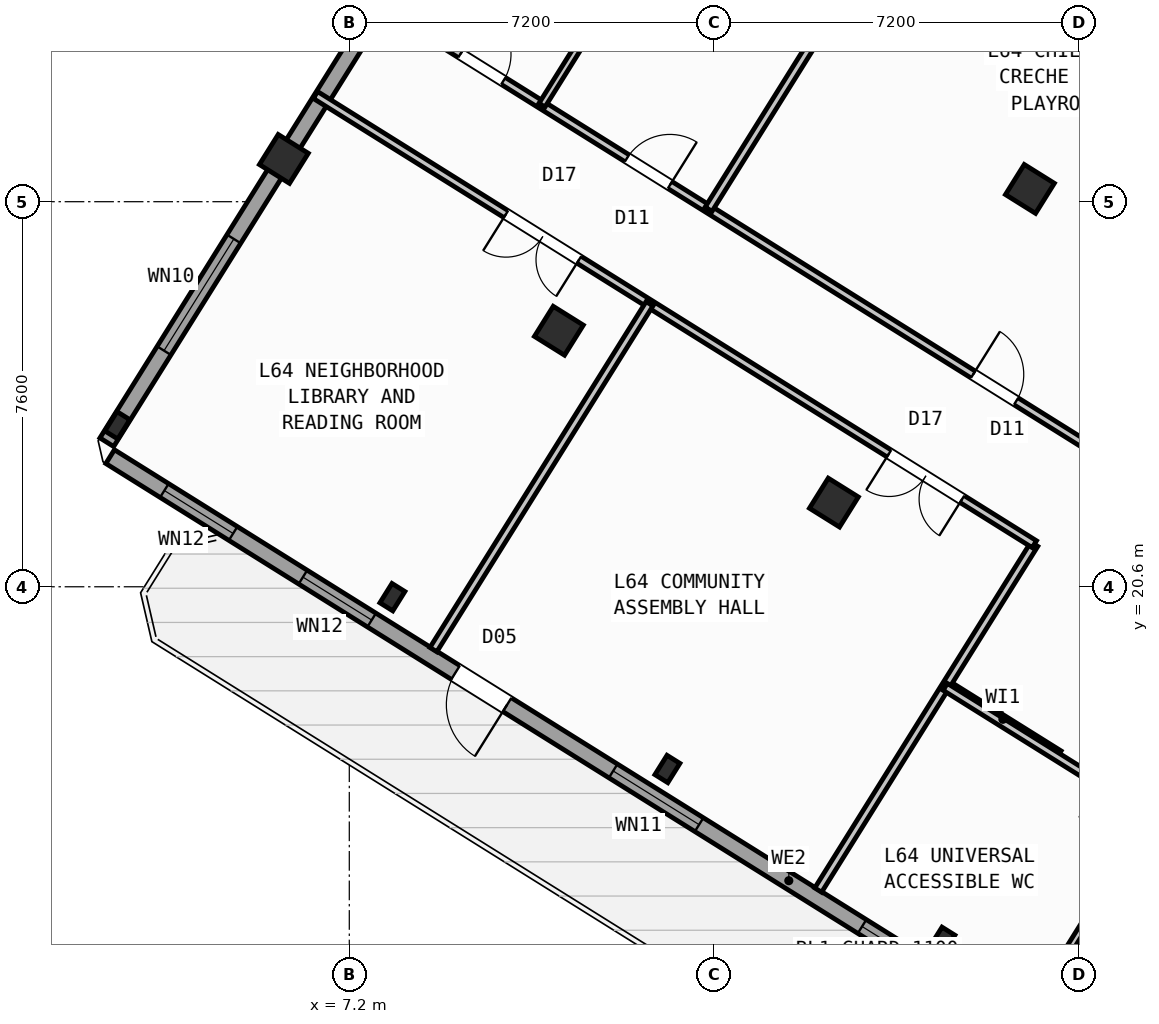
"""IFC4 building model, lengths in metres.
Left out: names, types, materials, properties, quantities, classifications, styles, units other than length and angle.
Written with IfcOpenShell. Run it as: python <this file> out.ifc"""

import sys

from ifc_helpers import new_model, si_unit, direction, frame, frame_2d, origin, origin_2d, place, context, subcontext, project, spatial, rectangle, hollow_rectangle, i_section, extrude, source, transform, mapped, element, fill, save


model = new_model("IFC4")
c1 = context("Model", 3, precision=1e-05, world=origin(), true_north=direction((0.0, 1.0)))
c2 = subcontext(c1, "Body", "Model", "MODEL_VIEW")
j1 = project(units=[si_unit("LENGTHUNIT", "METRE"), si_unit("PLANEANGLEUNIT", "RADIAN")], contexts=[c1])
p1 = place(None, origin())
s1 = spatial("IfcSite", under=j1, at=p1, CompositionType="ELEMENT")
p2 = place(p1, origin())
s2 = spatial("IfcBuilding", under=s1, at=p2, CompositionType="ELEMENT")
p3 = place(p2, frame((0.0, 0.0, 254.7)))
s3 = spatial("IfcBuildingStorey", under=s2, at=p3, CompositionType="ELEMENT", Elevation=254.7)
m1 = source(origin(), c2, "Body", "SweptSolid", [
    extrude(i_section(OverallWidth=0.3, OverallDepth=0.45, WebThickness=0.014, FlangeThickness=0.026, at=origin_2d()), origin(), (0.0, 0.0, 1.0), 4.5),
])
p4 = place(p3, frame((18.906, 13.612, 0.0), z_axis=(0.0, 0.0, 1.0), x_axis=(-0.848048096156, 0.529919264233, 0.0)))
e1 = element("IfcColumn", 1, at=p4, inside=s3, PredefinedType="COLUMN", context=c2, shape_type="MappedRepresentation", body=[
    mapped(m1, transform((0.0, 0.0, 0.0), scale=1.0)),
])
m2 = source(origin(), c2, "Body", "SweptSolid", [
    extrude(hollow_rectangle(XDim=0.7, YDim=0.7, WallThickness=0.028, at=origin_2d()), origin(), (0.0, 0.0, 1.0), 4.5),
])
for number, where, z_axis, x_axis in (
    (2, (20.632, 28.452, 0.0), (0.0, 0.0, 1.0), (-0.848, 0.53, 0.0)),
    (3, (16.764, 22.261, 0.0), (0.0, 0.0, 1.0), (-0.848, 0.53, 0.0)),
):
    element("IfcColumn", number, at=place(p3, frame(where, z_axis=z_axis, x_axis=x_axis)), inside=s3, PredefinedType="COLUMN", context=c2, shape_type="MappedRepresentation", body=[
        mapped(m2, transform((0.0, 0.0, 0.0), scale=1.0)),
    ])
p5 = place(p3, frame((13.478, 17.003, 0.0), z_axis=(0.0, 0.0, 1.0), x_axis=(-0.848048096156, 0.529919264233, 0.0)))
e4 = element("IfcColumn", 4, at=p5, inside=s3, PredefinedType="COLUMN", context=c2, shape_type="MappedRepresentation", body=[
    mapped(m1, transform((0.0, 0.0, 0.0), scale=1.0)),
])
p6 = place(p3, frame((11.336, 25.653, 0.0), z_axis=(0.0, 0.0, 1.0), x_axis=(-0.848048096156, 0.529919264233, 0.0)))
e5 = element("IfcColumn", 5, at=p6, inside=s3, PredefinedType="COLUMN", context=c2, shape_type="MappedRepresentation", body=[
    mapped(m2, transform((0.0, 0.0, 0.0), scale=1.0)),
])
p7 = place(p3, frame((8.051, 20.395, 0.0), z_axis=(0.0, 0.0, 1.0), x_axis=(-0.848048096156, 0.529919264233, 0.0)))
e6 = element("IfcColumn", 6, at=p7, inside=s3, PredefinedType="COLUMN", context=c2, shape_type="MappedRepresentation", body=[
    mapped(m1, transform((0.0, 0.0, 0.0), scale=1.0)),
])
p8 = place(p3, frame((5.909, 29.044, 0.0), z_axis=(0.0, 0.0, 1.0), x_axis=(-0.848048096156, 0.529919264233, 0.0)))
e7 = element("IfcColumn", 7, at=p8, inside=s3, PredefinedType="COLUMN", context=c2, shape_type="MappedRepresentation", body=[
    mapped(m2, transform((0.0, 0.0, 0.0), scale=1.0)),
])
p9 = place(p3, frame((2.623, 23.786, 0.0), z_axis=(0.0, 0.0, 1.0), x_axis=(-0.848048096156, 0.529919264233, 0.0)))
e8 = element("IfcColumn", 8, at=p9, inside=s3, PredefinedType="COLUMN", context=c2, shape_type="MappedRepresentation", body=[
    mapped(m1, transform((0.0, 0.0, 0.0), scale=1.0)),
])
p10 = place(p3, frame((29.268, 6.429, 0.0), z_axis=(0.0, 0.0, 1.0), x_axis=(-0.848049971435, 0.529916263149, 0.0)))
e9 = element("IfcWall", 9, at=p10, inside=s3, PredefinedType="STANDARD", context=c2, shape_type="SweptSolid", body=[
    extrude(rectangle(XDim=31.588, YDim=0.32, at=frame_2d((15.794, 0.0))), origin(), (0.0, 0.0, 1.0), 4.25),
])
p11 = place(p10, frame((22.349, 0.0, 0.0)))
e10 = element("IfcOpeningElement", 10, at=p11, cuts=e9, PredefinedType="OPENING", context=c2, shape_type="SweptSolid", body=[
    extrude(rectangle(XDim=1.2, YDim=2.15, at=frame_2d((0.6, 1.075))), frame((0.0, 0.17, 0.0), z_axis=(0.0, -1.0, 0.0), x_axis=(1.0, 0.0, 0.0)), (0.0, 0.0, 1.0), 0.34),
])
p12 = place(p10, frame((11.489, 0.0, 0.7)))
e11 = element("IfcOpeningElement", 11, at=p12, cuts=e9, PredefinedType="OPENING", context=c2, shape_type="SweptSolid", body=[
    extrude(rectangle(XDim=2.6, YDim=2.0, at=frame_2d((1.3, 1.0))), frame((0.0, 0.17, 0.0), z_axis=(0.0, -1.0, 0.0), x_axis=(1.0, 0.0, 0.0)), (0.0, 0.0, 1.0), 0.34),
])
p13 = place(p10, frame((17.881, 0.0, 0.75)))
e12 = element("IfcOpeningElement", 12, at=p13, cuts=e9, PredefinedType="OPENING", context=c2, shape_type="SweptSolid", body=[
    extrude(rectangle(XDim=2.0, YDim=1.95, at=frame_2d((1.0, 0.975))), frame((0.0, 0.17, 0.0), z_axis=(0.0, -1.0, 0.0), x_axis=(1.0, 0.0, 0.0)), (0.0, 0.0, 1.0), 0.34),
])
p14 = place(p10, frame((25.501, 0.0, 0.85)))
e13 = element("IfcOpeningElement", 13, at=p14, cuts=e9, PredefinedType="OPENING", context=c2, shape_type="SweptSolid", body=[
    extrude(rectangle(XDim=1.6, YDim=1.8, at=frame_2d((0.8, 0.9))), frame((0.0, 0.17, 0.0), z_axis=(0.0, -1.0, 0.0), x_axis=(1.0, 0.0, 0.0)), (0.0, 0.0, 1.0), 0.34),
])
p15 = place(p10, frame((28.725, 0.0, 0.85)))
e14 = element("IfcOpeningElement", 14, at=p15, cuts=e9, PredefinedType="OPENING", context=c2, shape_type="SweptSolid", body=[
    extrude(rectangle(XDim=1.6, YDim=1.8, at=frame_2d((0.8, 0.9))), frame((0.0, 0.17, 0.0), z_axis=(0.0, -1.0, 0.0), x_axis=(1.0, 0.0, 0.0)), (0.0, 0.0, 1.0), 0.34),
])
p16 = place(p3, frame((2.415, 23.452, 0.0), z_axis=(0.0, 0.0, 1.0), x_axis=(0.52991049553, 0.848053575387, 0.0)))
e15 = element("IfcWall", 15, at=p16, inside=s3, PredefinedType="STANDARD", context=c2, shape_type="SweptSolid", body=[
    extrude(rectangle(XDim=21.587, YDim=0.32, at=frame_2d((10.794, 0.0))), origin(), (0.0, 0.0, 1.0), 3.775),
])
p17 = place(p16, frame((2.131, 0.0, 0.7)))
e16 = element("IfcOpeningElement", 16, at=p17, cuts=e15, PredefinedType="OPENING", context=c2, shape_type="SweptSolid", body=[
    extrude(rectangle(XDim=2.6, YDim=2.0, at=frame_2d((1.3, 1.0))), frame((0.0, 0.17, 0.0), z_axis=(0.0, -1.0, 0.0), x_axis=(1.0, 0.0, 0.0)), (0.0, 0.0, 1.0), 0.34),
])
p18 = place(p16, frame((10.959, 0.0, 0.75)))
e17 = element("IfcOpeningElement", 17, at=p18, cuts=e15, PredefinedType="OPENING", context=c2, shape_type="SweptSolid", body=[
    extrude(rectangle(XDim=2.0, YDim=1.95, at=frame_2d((1.0, 0.975))), frame((0.0, 0.17, 0.0), z_axis=(0.0, -1.0, 0.0), x_axis=(1.0, 0.0, 0.0)), (0.0, 0.0, 1.0), 0.34),
])
p19 = place(p16, frame((15.269, 0.0, 0.85)))
e18 = element("IfcOpeningElement", 18, at=p19, cuts=e15, PredefinedType="OPENING", context=c2, shape_type="SweptSolid", body=[
    extrude(rectangle(XDim=1.6, YDim=1.8, at=frame_2d((0.8, 0.9))), frame((0.0, 0.17, 0.0), z_axis=(0.0, -1.0, 0.0), x_axis=(1.0, 0.0, 0.0)), (0.0, 0.0, 1.0), 0.34),
])
p20 = place(p16, frame((18.219, 0.0, 0.85)))
e19 = element("IfcOpeningElement", 19, at=p20, cuts=e15, PredefinedType="OPENING", context=c2, shape_type="SweptSolid", body=[
    extrude(rectangle(XDim=1.6, YDim=1.8, at=frame_2d((0.8, 0.9))), frame((0.0, 0.17, 0.0), z_axis=(0.0, -1.0, 0.0), x_axis=(1.0, 0.0, 0.0)), (0.0, 0.0, 1.0), 0.34),
])
p21 = place(p3, frame((14.138, 41.825, 0.0), z_axis=(0.0, 0.0, 1.0), x_axis=(0.848046498049, -0.529921821731, 0.0)))
e20 = element("IfcWall", 20, at=p21, inside=s3, PredefinedType="STANDARD", context=c2, shape_type="SweptSolid", body=[
    extrude(rectangle(XDim=31.588, YDim=0.32, at=frame_2d((15.794, 0.0))), origin(), (0.0, 0.0, 1.0), 4.25),
])
p22 = place(p21, frame((9.946, 0.0, 0.0)))
e21 = element("IfcOpeningElement", 21, at=p22, cuts=e20, PredefinedType="OPENING", context=c2, shape_type="SweptSolid", body=[
    extrude(rectangle(XDim=1.05, YDim=2.15, at=frame_2d((0.525, 1.075))), frame((0.0, 0.17, 0.0), z_axis=(0.0, -1.0, 0.0), x_axis=(1.0, 0.0, 0.0)), (0.0, 0.0, 1.0), 0.34),
])
p23 = place(p21, frame((0.763, 0.0, 0.75)))
e22 = element("IfcOpeningElement", 22, at=p23, cuts=e20, PredefinedType="OPENING", context=c2, shape_type="SweptSolid", body=[
    extrude(rectangle(XDim=2.0, YDim=1.95, at=frame_2d((1.0, 0.975))), frame((0.0, 0.17, 0.0), z_axis=(0.0, -1.0, 0.0), x_axis=(1.0, 0.0, 0.0)), (0.0, 0.0, 1.0), 0.34),
])
p24 = place(p21, frame((13.574, 0.0, 0.75)))
e23 = element("IfcOpeningElement", 23, at=p24, cuts=e20, PredefinedType="OPENING", context=c2, shape_type="SweptSolid", body=[
    extrude(rectangle(XDim=2.0, YDim=1.95, at=frame_2d((1.0, 0.975))), frame((0.0, 0.17, 0.0), z_axis=(0.0, -1.0, 0.0), x_axis=(1.0, 0.0, 0.0)), (0.0, 0.0, 1.0), 0.34),
])
p25 = place(p21, frame((21.744, 0.0, 0.85)))
e24 = element("IfcOpeningElement", 24, at=p25, cuts=e20, PredefinedType="OPENING", context=c2, shape_type="SweptSolid", body=[
    extrude(rectangle(XDim=1.6, YDim=1.8, at=frame_2d((0.8, 0.9))), frame((0.0, 0.17, 0.0), z_axis=(0.0, -1.0, 0.0), x_axis=(1.0, 0.0, 0.0)), (0.0, 0.0, 1.0), 0.34),
])
p26 = place(p21, frame((27.444, 0.0, 0.85)))
e25 = element("IfcOpeningElement", 25, at=p26, cuts=e20, PredefinedType="OPENING", context=c2, shape_type="SweptSolid", body=[
    extrude(rectangle(XDim=1.6, YDim=1.8, at=frame_2d((0.8, 0.9))), frame((0.0, 0.17, 0.0), z_axis=(0.0, -1.0, 0.0), x_axis=(1.0, 0.0, 0.0)), (0.0, 0.0, 1.0), 0.34),
])
p27 = place(p3, frame((21.206, 17.292, 0.0), z_axis=(0.0, 0.0, 1.0), x_axis=(-0.848050851465, 0.529914854792, 0.0)))
e26 = element("IfcWall", 26, at=p27, inside=s3, PredefinedType="PARTITIONING", context=c2, shape_type="SweptSolid", body=[
    extrude(rectangle(XDim=2.61, YDim=0.16, at=frame_2d((1.305, 0.0))), origin(), (0.0, 0.0, 1.0), 4.24),
])
p28 = place(p3, frame((20.719, 21.44, 0.0), z_axis=(0.0, 0.0, 1.0), x_axis=(-0.529906246318, -0.848056230514, 0.0)))
e27 = element("IfcWall", 27, at=p28, inside=s3, PredefinedType="PARTITIONING", context=c2, shape_type="SweptSolid", body=[
    extrude(rectangle(XDim=8.05, YDim=0.16, at=frame_2d((4.025, 0.0))), origin(), (0.0, 0.0, 1.0), 4.24),
])
p29 = place(p3, frame((21.885, 23.306, 0.0), z_axis=(0.0, 0.0, 1.0), x_axis=(-0.848052408131, 0.529912363569, 0.0)))
e28 = element("IfcWall", 28, at=p29, inside=s3, PredefinedType="PARTITIONING", context=c2, shape_type="SweptSolid", body=[
    extrude(rectangle(XDim=16.73, YDim=0.16, at=frame_2d((8.365, 0.0))), origin(), (0.0, 0.0, 1.0), 4.24),
])
p30 = place(p29, frame((1.8, 0.0, 0.0)))
e29 = element("IfcOpeningElement", 29, at=p30, cuts=e28, PredefinedType="OPENING", context=c2, shape_type="SweptSolid", body=[
    extrude(rectangle(XDim=1.0, YDim=2.1, at=frame_2d((0.5, 1.05))), frame((0.0, 0.09, 0.0), z_axis=(0.0, -1.0, 0.0), x_axis=(1.0, 0.0, 0.0)), (0.0, 0.0, 1.0), 0.18),
])
p31 = place(p29, frame((9.855, 0.0, 0.0)))
e30 = element("IfcOpeningElement", 30, at=p31, cuts=e28, PredefinedType="OPENING", context=c2, shape_type="SweptSolid", body=[
    extrude(rectangle(XDim=1.0, YDim=2.1, at=frame_2d((0.5, 1.05))), frame((0.0, 0.09, 0.0), z_axis=(0.0, -1.0, 0.0), x_axis=(1.0, 0.0, 0.0)), (0.0, 0.0, 1.0), 0.18),
])
p32 = place(p29, frame((13.732, 0.0, 0.0)))
e31 = element("IfcOpeningElement", 31, at=p32, cuts=e28, PredefinedType="OPENING", context=c2, shape_type="SweptSolid", body=[
    extrude(rectangle(XDim=1.0, YDim=2.1, at=frame_2d((0.5, 1.05))), frame((0.0, 0.09, 0.0), z_axis=(0.0, -1.0, 0.0), x_axis=(1.0, 0.0, 0.0)), (0.0, 0.0, 1.0), 0.18),
])
p33 = place(p3, frame((20.719, 21.44, 0.0), z_axis=(0.0, 0.0, 1.0), x_axis=(-0.848048310262, 0.529918921593, 0.0)))
e32 = element("IfcWall", 32, at=p33, inside=s3, PredefinedType="PARTITIONING", context=c2, shape_type="SweptSolid", body=[
    extrude(rectangle(XDim=16.73, YDim=0.16, at=frame_2d((8.365, 0.0))), origin(), (0.0, 0.0, 1.0), 4.24),
])
p34 = place(p33, frame((1.68, 0.0, 0.0)))
e33 = element("IfcOpeningElement", 33, at=p34, cuts=e32, PredefinedType="OPENING", context=c2, shape_type="SweptSolid", body=[
    extrude(rectangle(XDim=1.7, YDim=2.2, at=frame_2d((0.85, 1.1))), frame((0.0, 0.09, 0.0), z_axis=(0.0, -1.0, 0.0), x_axis=(1.0, 0.0, 0.0)), (0.0, 0.0, 1.0), 0.18),
])
p35 = place(p33, frame((10.595, 0.0, 0.0)))
e34 = element("IfcOpeningElement", 34, at=p35, cuts=e32, PredefinedType="OPENING", context=c2, shape_type="SweptSolid", body=[
    extrude(rectangle(XDim=1.7, YDim=2.2, at=frame_2d((0.85, 1.1))), frame((0.0, 0.09, 0.0), z_axis=(0.0, -1.0, 0.0), x_axis=(1.0, 0.0, 0.0)), (0.0, 0.0, 1.0), 0.18),
])
p36 = place(p3, frame((13.125, 26.186, 0.0), z_axis=(0.0, 0.0, 1.0), x_axis=(-0.529928058306, -0.848042600947, 0.0)))
e35 = element("IfcWall", 35, at=p36, inside=s3, PredefinedType="PARTITIONING", context=c2, shape_type="SweptSolid", body=[
    extrude(rectangle(XDim=8.05, YDim=0.16, at=frame_2d((4.025, 0.0))), origin(), (0.0, 0.0, 1.0), 4.24),
])
p37 = place(p3, frame((20.359, 37.761, 0.0), z_axis=(0.0, 0.0, 1.0), x_axis=(-0.529905022231, -0.848056995381, 0.0)))
e36 = element("IfcWall", 36, at=p37, inside=s3, PredefinedType="PARTITIONING", context=c2, shape_type="SweptSolid", body=[
    extrude(rectangle(XDim=11.45, YDim=0.16, at=frame_2d((5.725, 0.0))), origin(), (0.0, 0.0, 1.0), 4.24),
])
p38 = place(p3, frame((17.15, 39.943, 0.0), z_axis=(0.0, 0.0, 1.0), x_axis=(-0.529936507712, -0.848037320991, 0.0)))
e37 = element("IfcWall", 37, at=p38, inside=s3, PredefinedType="PLUMBINGWALL", context=c2, shape_type="SweptSolid", body=[
    extrude(rectangle(XDim=11.6, YDim=0.14, at=frame_2d((5.8, 0.0))), origin(), (0.0, 0.0, 1.0), 4.24),
])
p39 = place(p3, frame((32.164, 10.374, 0.0), z_axis=(0.0, 0.0, 1.0), x_axis=(-0.848044107957, 0.529925646633, 0.0)))
e38 = element("IfcWall", 38, at=p39, inside=s3, PredefinedType="PARTITIONING", context=c2, shape_type="SweptSolid", body=[
    extrude(rectangle(XDim=15.57, YDim=0.16, at=frame_2d((7.785, 0.0))), origin(), (0.0, 0.0, 1.0), 4.24),
])
p40 = place(p39, frame((0.85, 0.0, 0.0)))
e39 = element("IfcOpeningElement", 39, at=p40, cuts=e38, PredefinedType="OPENING", context=c2, shape_type="SweptSolid", body=[
    extrude(rectangle(XDim=0.86, YDim=2.05, at=frame_2d((0.43, 1.025))), frame((0.0, 0.09, 0.0), z_axis=(0.0, -1.0, 0.0), x_axis=(1.0, 0.0, 0.0)), (0.0, 0.0, 1.0), 0.18),
])
p41 = place(p39, frame((3.87, 0.0, 0.0)))
e40 = element("IfcOpeningElement", 40, at=p41, cuts=e38, PredefinedType="OPENING", context=c2, shape_type="SweptSolid", body=[
    extrude(rectangle(XDim=0.86, YDim=2.05, at=frame_2d((0.43, 1.025))), frame((0.0, 0.09, 0.0), z_axis=(0.0, -1.0, 0.0), x_axis=(1.0, 0.0, 0.0)), (0.0, 0.0, 1.0), 0.18),
])
p42 = place(p39, frame((6.33, 0.0, 0.0)))
e41 = element("IfcOpeningElement", 41, at=p42, cuts=e38, PredefinedType="OPENING", context=c2, shape_type="SweptSolid", body=[
    extrude(rectangle(XDim=0.78, YDim=2.05, at=frame_2d((0.39, 1.025))), frame((0.0, 0.09, 0.0), z_axis=(0.0, -1.0, 0.0), x_axis=(1.0, 0.0, 0.0)), (0.0, 0.0, 1.0), 0.18),
])
p43 = place(p39, frame((8.78, 0.0, 0.0)))
e42 = element("IfcOpeningElement", 42, at=p43, cuts=e38, PredefinedType="OPENING", context=c2, shape_type="SweptSolid", body=[
    extrude(rectangle(XDim=0.78, YDim=2.05, at=frame_2d((0.39, 1.025))), frame((0.0, 0.09, 0.0), z_axis=(0.0, -1.0, 0.0), x_axis=(1.0, 0.0, 0.0)), (0.0, 0.0, 1.0), 0.18),
])
p44 = place(p39, frame((11.18, 0.0, 0.0)))
e43 = element("IfcOpeningElement", 43, at=p44, cuts=e38, PredefinedType="OPENING", context=c2, shape_type="SweptSolid", body=[
    extrude(rectangle(XDim=0.78, YDim=2.05, at=frame_2d((0.39, 1.025))), frame((0.0, 0.09, 0.0), z_axis=(0.0, -1.0, 0.0), x_axis=(1.0, 0.0, 0.0)), (0.0, 0.0, 1.0), 0.18),
])
p45 = place(p3, frame((23.111, 16.172, 0.0), z_axis=(0.0, 0.0, 1.0), x_axis=(-0.529890046623, -0.848066352646, 0.0)))
e44 = element("IfcWall", 44, at=p45, inside=s3, PredefinedType="PLUMBINGWALL", context=c2, shape_type="SweptSolid", body=[
    extrude(rectangle(XDim=5.24, YDim=0.14, at=frame_2d((2.62, 0.0))), origin(), (0.0, 0.0, 1.0), 4.24),
])
m3 = source(origin(), c2, "Body", "SweptSolid", [
    extrude(rectangle(XDim=1.2, YDim=2.15, at=frame_2d((0.6, 1.075))), frame((0.0, 0.025, 0.0), z_axis=(0.0, -1.0, 0.0), x_axis=(1.0, 0.0, 0.0)), (0.0, 0.0, 1.0), 0.05),
])
p46 = place(p11, origin())
e45 = element("IfcDoor", 45, at=p46, inside=s3, OperationType="SINGLE_SWING_LEFT", PredefinedType="DOOR", context=c2, shape_type="MappedRepresentation", body=[
    mapped(m3, transform((0.0, 0.0, 0.0), scale=1.0)),
])
fill(e10, e45)
m4 = source(origin(), c2, "Body", "SweptSolid", [
    extrude(rectangle(XDim=2.6, YDim=2.0, at=frame_2d((1.3, 1.0))), frame((0.0, 0.03, 0.0), z_axis=(0.0, -1.0, 0.0), x_axis=(1.0, 0.0, 0.0)), (0.0, 0.0, 1.0), 0.06),
])
p47 = place(p12, origin())
e46 = element("IfcWindow", 46, at=p47, inside=s3, PartitioningType="SINGLE_PANEL", PredefinedType="WINDOW", context=c2, shape_type="MappedRepresentation", body=[
    mapped(m4, transform((0.0, 0.0, 0.0), scale=1.0)),
])
fill(e11, e46)
m5 = source(origin(), c2, "Body", "SweptSolid", [
    extrude(rectangle(XDim=2.0, YDim=1.95, at=frame_2d((1.0, 0.975))), frame((0.0, 0.03, 0.0), z_axis=(0.0, -1.0, 0.0), x_axis=(1.0, 0.0, 0.0)), (0.0, 0.0, 1.0), 0.06),
])
p48 = place(p13, origin())
e47 = element("IfcWindow", 47, at=p48, inside=s3, PartitioningType="SINGLE_PANEL", PredefinedType="WINDOW", context=c2, shape_type="MappedRepresentation", body=[
    mapped(m5, transform((0.0, 0.0, 0.0), scale=1.0)),
])
fill(e12, e47)
m6 = source(origin(), c2, "Body", "SweptSolid", [
    extrude(rectangle(XDim=1.6, YDim=1.8, at=frame_2d((0.8, 0.9))), frame((0.0, 0.03, 0.0), z_axis=(0.0, -1.0, 0.0), x_axis=(1.0, 0.0, 0.0)), (0.0, 0.0, 1.0), 0.06),
])
p49 = place(p14, origin())
e48 = element("IfcWindow", 48, at=p49, inside=s3, PartitioningType="SINGLE_PANEL", PredefinedType="WINDOW", context=c2, shape_type="MappedRepresentation", body=[
    mapped(m6, transform((0.0, 0.0, 0.0), scale=1.0)),
])
fill(e13, e48)
p50 = place(p15, origin())
e49 = element("IfcWindow", 49, at=p50, inside=s3, PartitioningType="SINGLE_PANEL", PredefinedType="WINDOW", context=c2, shape_type="MappedRepresentation", body=[
    mapped(m6, transform((0.0, 0.0, 0.0), scale=1.0)),
])
fill(e14, e49)
p51 = place(p17, origin())
e50 = element("IfcWindow", 50, at=p51, inside=s3, PartitioningType="SINGLE_PANEL", PredefinedType="WINDOW", context=c2, shape_type="MappedRepresentation", body=[
    mapped(m4, transform((0.0, 0.0, 0.0), scale=1.0)),
])
fill(e16, e50)
m7 = source(origin(), c2, "Body", "SweptSolid", [
    extrude(rectangle(XDim=1.7, YDim=2.2, at=frame_2d((0.85, 1.1))), frame((0.0, 0.025, 0.0), z_axis=(0.0, -1.0, 0.0), x_axis=(1.0, 0.0, 0.0)), (0.0, 0.0, 1.0), 0.05),
])
p52 = place(p34, origin())
e51 = element("IfcDoor", 51, at=p52, inside=s3, OperationType="DOUBLE_DOOR_SINGLE_SWING", PredefinedType="DOOR", context=c2, shape_type="MappedRepresentation", body=[
    mapped(m7, transform((0.0, 0.0, 0.0), scale=1.0)),
])
fill(e33, e51)
p53 = place(p35, origin())
e52 = element("IfcDoor", 52, at=p53, inside=s3, OperationType="DOUBLE_DOOR_SINGLE_SWING", PredefinedType="DOOR", context=c2, shape_type="MappedRepresentation", body=[
    mapped(m7, transform((0.0, 0.0, 0.0), scale=1.0)),
])
fill(e34, e52)
m8 = source(origin(), c2, "Body", "SweptSolid", [
    extrude(rectangle(XDim=1.0, YDim=2.1, at=frame_2d((0.5, 1.05))), frame((0.0, 0.025, 0.0), z_axis=(0.0, -1.0, 0.0), x_axis=(1.0, 0.0, 0.0)), (0.0, 0.0, 1.0), 0.05),
])
p54 = place(p30, frame((1.0, 0.0, 0.0), z_axis=(0.0, 0.0, 1.0), x_axis=(-1.0, 0.0, 0.0)))
e53 = element("IfcDoor", 53, at=p54, inside=s3, OperationType="SINGLE_SWING_LEFT", PredefinedType="DOOR", context=c2, shape_type="MappedRepresentation", body=[
    mapped(m8, transform((0.0, 0.0, 0.0), scale=1.0)),
])
fill(e29, e53)
p55 = place(p31, frame((1.0, 0.0, 0.0), z_axis=(0.0, 0.0, 1.0), x_axis=(-1.0, 0.0, 0.0)))
e54 = element("IfcDoor", 54, at=p55, inside=s3, OperationType="SINGLE_SWING_RIGHT", PredefinedType="DOOR", context=c2, shape_type="MappedRepresentation", body=[
    mapped(m8, transform((0.0, 0.0, 0.0), scale=1.0)),
])
fill(e30, e54)
p56 = place(p32, frame((1.0, 0.0, 0.0), z_axis=(0.0, 0.0, 1.0), x_axis=(-1.0, 0.0, 0.0)))
e55 = element("IfcDoor", 55, at=p56, inside=s3, OperationType="SINGLE_SWING_LEFT", PredefinedType="DOOR", context=c2, shape_type="MappedRepresentation", body=[
    mapped(m8, transform((0.0, 0.0, 0.0), scale=1.0)),
])
fill(e31, e55)
save(model, sys.argv[1])
